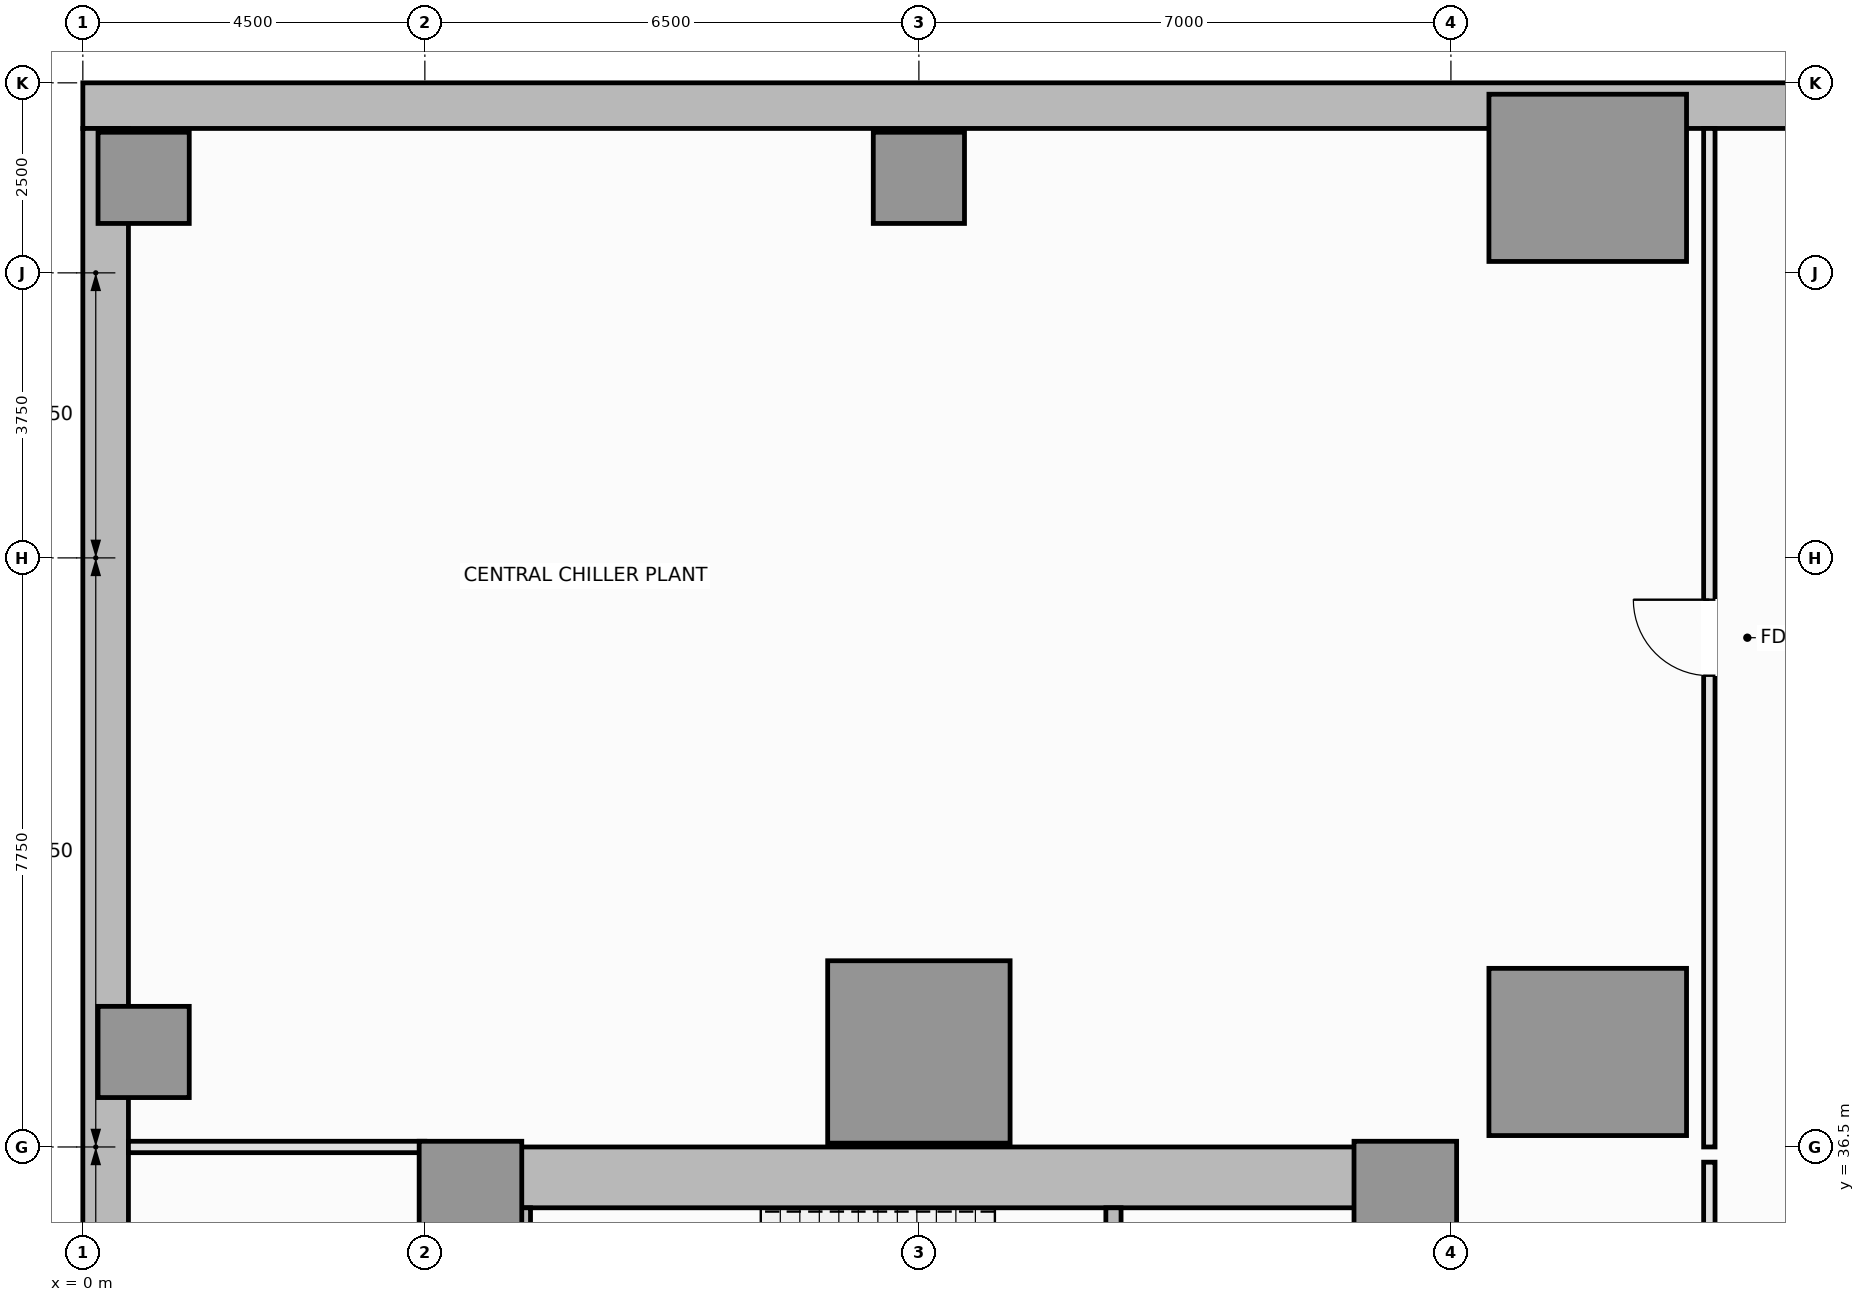
"""IFC4 building model, lengths in metres.
Left out: names, types, materials, properties, quantities, classifications, styles, units other than length and angle.
Written with IfcOpenShell. Run it as: python <this file> out.ifc"""

import sys

from ifc_helpers import new_model, si_unit, direction, frame, frame_2d, origin, origin_2d, place, context, subcontext, project, spatial, rectangle, extrude, element, fill, save


model = new_model("IFC4")
c1 = context("Model", 3, precision=1e-05, world=origin(), true_north=direction((0.0, 1.0)))
c2 = subcontext(c1, "Body", "Model", "MODEL_VIEW")
j1 = project(units=[si_unit("LENGTHUNIT", "METRE"), si_unit("PLANEANGLEUNIT", "RADIAN")], contexts=[c1])
p1 = place(None, origin())
s1 = spatial("IfcSite", under=j1, at=p1, CompositionType="ELEMENT")
p2 = place(p1, origin())
s2 = spatial("IfcBuilding", under=s1, at=p2, CompositionType="ELEMENT")
p3 = place(p2, frame((0.0, 0.0, -13.2)))
s3 = spatial("IfcBuildingStorey", under=s2, at=p3, CompositionType="ELEMENT", Elevation=-13.2)
p4 = place(p3, frame((0.0, 50.2, 0.0), z_axis=(0.0, 0.0, 1.0), x_axis=(1.0, 0.0, 0.0)))
e1 = element("IfcWall", 1, at=p4, inside=s3, PredefinedType="USERDEFINED", context=c2, shape_type="SweptSolid", body=[
    extrude(rectangle(XDim=58.0, YDim=0.6, at=frame_2d((29.0, 0.0))), origin(), (0.0, 0.0, 1.0), 4.2),
])
p5 = place(p3, frame((0.3, 0.6, 0.0), z_axis=(0.0, 0.0, 1.0), x_axis=(0.0, 1.0, 0.0)))
e2 = element("IfcWall", 2, at=p5, inside=s3, PredefinedType="USERDEFINED", context=c2, shape_type="SweptSolid", body=[
    extrude(rectangle(XDim=49.3, YDim=0.6, at=frame_2d((24.65, 0.0))), origin(), (0.0, 0.0, 1.0), 4.2),
])
p6 = place(p3, frame((4.5, 36.1, 0.0), z_axis=(0.0, 0.0, 1.0), x_axis=(1.0, 0.0, 0.0)))
e3 = element("IfcWall", 3, at=p6, inside=s3, PredefinedType="SHEAR", context=c2, shape_type="SweptSolid", body=[
    extrude(rectangle(XDim=13.5, YDim=0.8, at=frame_2d((6.75, 0.0))), origin(), (0.0, 0.0, 1.0), 4.2),
])
p7 = place(p3, frame((4.9, 14.8, 0.0), z_axis=(0.0, 0.0, 1.0), x_axis=(0.0, 1.0, 0.0)))
e4 = element("IfcWall", 4, at=p7, inside=s3, PredefinedType="SHEAR", context=c2, shape_type="SweptSolid", body=[
    extrude(rectangle(XDim=20.9, YDim=0.8, at=frame_2d((10.45, 0.0))), origin(), (0.0, 0.0, 1.0), 4.2),
])
p8 = place(p3, frame((17.6, 27.05, 0.0), z_axis=(0.0, 0.0, 1.0), x_axis=(0.0, 1.0, 0.0)))
e5 = element("IfcWall", 5, at=p8, inside=s3, PredefinedType="SHEAR", context=c2, shape_type="SweptSolid", body=[
    extrude(rectangle(XDim=8.65, YDim=0.8, at=frame_2d((4.325, 0.0))), origin(), (0.0, 0.0, 1.0), 4.2),
])
p9 = place(p8, frame((3.45, 0.0, 0.0)))
e6 = element("IfcOpeningElement", 6, at=p9, cuts=e5, PredefinedType="OPENING", context=c2, shape_type="SweptSolid", body=[
    extrude(rectangle(XDim=1.1, YDim=2.15, at=frame_2d((0.55, 1.075))), frame((0.0, 0.41, 0.0), z_axis=(0.0, -1.0, 0.0), x_axis=(1.0, 0.0, 0.0)), (0.0, 0.0, 1.0), 0.82),
])
for number, where, z_axis, x_axis in (
    (7, (5.1, 35.9, 0.0), (0.0, 0.0, 1.0), (1.0, 0.0, 0.0)),
    (8, (17.4, 35.9, 0.0), (0.0, 0.0, 1.0), (1.0, 0.0, 0.0)),
):
    element("IfcColumn", number, at=place(p3, frame(where, z_axis=z_axis, x_axis=x_axis)), inside=s3, PredefinedType="PILASTER", context=c2, shape_type="SweptSolid", body=[
        extrude(rectangle(XDim=1.35, YDim=1.35, at=origin_2d()), origin(), (0.0, 0.0, 1.0), 4.2),
    ])
p10 = place(p3, frame((11.0, 37.75, 0.0), z_axis=(0.0, 0.0, 1.0), x_axis=(1.0, 0.0, 0.0)))
e9 = element("IfcColumn", 9, at=p10, inside=s3, PredefinedType="COLUMN", context=c2, shape_type="SweptSolid", body=[
    extrude(rectangle(XDim=2.4, YDim=2.4, at=origin_2d()), origin(), (0.0, 0.0, 1.0), 4.2),
])
for number, where, z_axis, x_axis in (
    (10, (19.8, 37.75, 0.0), (0.0, 0.0, 1.0), (1.0, 0.0, 0.0)),
    (11, (19.8, 49.25, 0.0), (0.0, 0.0, 1.0), (1.0, 0.0, 0.0)),
):
    element("IfcColumn", number, at=place(p3, frame(where, z_axis=z_axis, x_axis=x_axis)), inside=s3, PredefinedType="COLUMN", context=c2, shape_type="SweptSolid", body=[
        extrude(rectangle(XDim=2.6, YDim=2.2, at=origin_2d()), origin(), (0.0, 0.0, 1.0), 4.2),
    ])
for number, where, z_axis, x_axis in (
    (12, (0.8, 37.75, 0.0), (0.0, 0.0, 1.0), (1.0, 0.0, 0.0)),
    (13, (0.8, 49.25, 0.0), (0.0, 0.0, 1.0), (1.0, 0.0, 0.0)),
    (14, (11.0, 49.25, 0.0), (0.0, 0.0, 1.0), (1.0, 0.0, 0.0)),
):
    element("IfcColumn", number, at=place(p3, frame(where, z_axis=z_axis, x_axis=x_axis)), inside=s3, PredefinedType="COLUMN", context=c2, shape_type="SweptSolid", body=[
        extrude(rectangle(XDim=1.2, YDim=1.2, at=origin_2d()), origin(), (0.0, 0.0, 1.0), 4.2),
    ])
p11 = place(p3, frame((5.79, 32.65, 0.0), z_axis=(0.0, 0.0, 1.0), x_axis=(0.0, 1.0, 0.0)))
e15 = element("IfcWall", 15, at=p11, inside=s3, PredefinedType="SOLIDWALL", context=c2, shape_type="SweptSolid", body=[
    extrude(rectangle(XDim=3.05, YDim=0.2, at=frame_2d((1.525, 0.0))), origin(), (0.0, 0.0, 1.0), 4.2),
])
p12 = place(p3, frame((13.56, 32.65, 0.0), z_axis=(0.0, 0.0, 1.0), x_axis=(0.0, 1.0, 0.0)))
e16 = element("IfcWall", 16, at=p12, inside=s3, PredefinedType="SOLIDWALL", context=c2, shape_type="SweptSolid", body=[
    extrude(rectangle(XDim=3.05, YDim=0.2, at=frame_2d((1.525, 0.0))), origin(), (0.0, 0.0, 1.0), 4.2),
])
p13 = place(p12, frame((0.95, 0.0, 0.0)))
e17 = element("IfcOpeningElement", 17, at=p13, cuts=e16, PredefinedType="OPENING", context=c2, shape_type="SweptSolid", body=[
    extrude(rectangle(XDim=1.15, YDim=2.15, at=frame_2d((0.575, 1.075))), frame((0.0, 0.11, 0.0), z_axis=(0.0, -1.0, 0.0), x_axis=(1.0, 0.0, 0.0)), (0.0, 0.0, 1.0), 0.22),
])
p14 = place(p3, frame((21.4, 14.2, 0.0), z_axis=(0.0, 0.0, 1.0), x_axis=(0.0, 1.0, 0.0)))
e18 = element("IfcWall", 18, at=p14, inside=s3, PredefinedType="PARTITIONING", context=c2, shape_type="SweptSolid", body=[
    extrude(rectangle(XDim=22.1, YDim=0.15, at=frame_2d((11.05, 0.0))), origin(), (0.0, 0.0, 1.0), 4.0),
])
p15 = place(p14, frame((10.55, 0.0, 0.0)))
e19 = element("IfcOpeningElement", 19, at=p15, cuts=e18, PredefinedType="OPENING", context=c2, shape_type="SweptSolid", body=[
    extrude(rectangle(XDim=1.0, YDim=2.15, at=frame_2d((0.5, 1.075))), frame((0.0, 0.085, 0.0), z_axis=(0.0, -1.0, 0.0), x_axis=(1.0, 0.0, 0.0)), (0.0, 0.0, 1.0), 0.17),
])
p16 = place(p3, frame((0.6, 36.5, 0.0), z_axis=(0.0, 0.0, 1.0), x_axis=(1.0, 0.0, 0.0)))
e20 = element("IfcWall", 20, at=p16, inside=s3, PredefinedType="PARTITIONING", context=c2, shape_type="SweptSolid", body=[
    extrude(rectangle(XDim=3.9, YDim=0.15, at=frame_2d((1.95, 0.0))), origin(), (0.0, 0.0, 1.0), 4.0),
])
p17 = place(p3, frame((21.4, 36.5, 0.0), z_axis=(0.0, 0.0, 1.0), x_axis=(0.0, 1.0, 0.0)))
e21 = element("IfcWall", 21, at=p17, inside=s3, PredefinedType="PARTITIONING", context=c2, shape_type="SweptSolid", body=[
    extrude(rectangle(XDim=13.4, YDim=0.15, at=frame_2d((6.7, 0.0))), origin(), (0.0, 0.0, 1.0), 4.0),
])
p18 = place(p17, frame((6.2, 0.0, 0.0)))
e22 = element("IfcOpeningElement", 22, at=p18, cuts=e21, PredefinedType="OPENING", context=c2, shape_type="SweptSolid", body=[
    extrude(rectangle(XDim=1.0, YDim=2.15, at=frame_2d((0.5, 1.075))), frame((0.0, 0.085, 0.0), z_axis=(0.0, -1.0, 0.0), x_axis=(1.0, 0.0, 0.0)), (0.0, 0.0, 1.0), 0.17),
])
p19 = place(p18, origin())
e23 = element("IfcDoor", 23, at=p19, inside=s3, OperationType="SINGLE_SWING_RIGHT", PredefinedType="DOOR", context=c2, shape_type="SweptSolid", body=[
    extrude(rectangle(XDim=1.0, YDim=2.15, at=frame_2d((0.5, 1.075))), frame((0.0, 0.025, 0.0), z_axis=(0.0, -1.0, 0.0), x_axis=(1.0, 0.0, 0.0)), (0.0, 0.0, 1.0), 0.05),
])
fill(e22, e23)
save(model, sys.argv[1])
